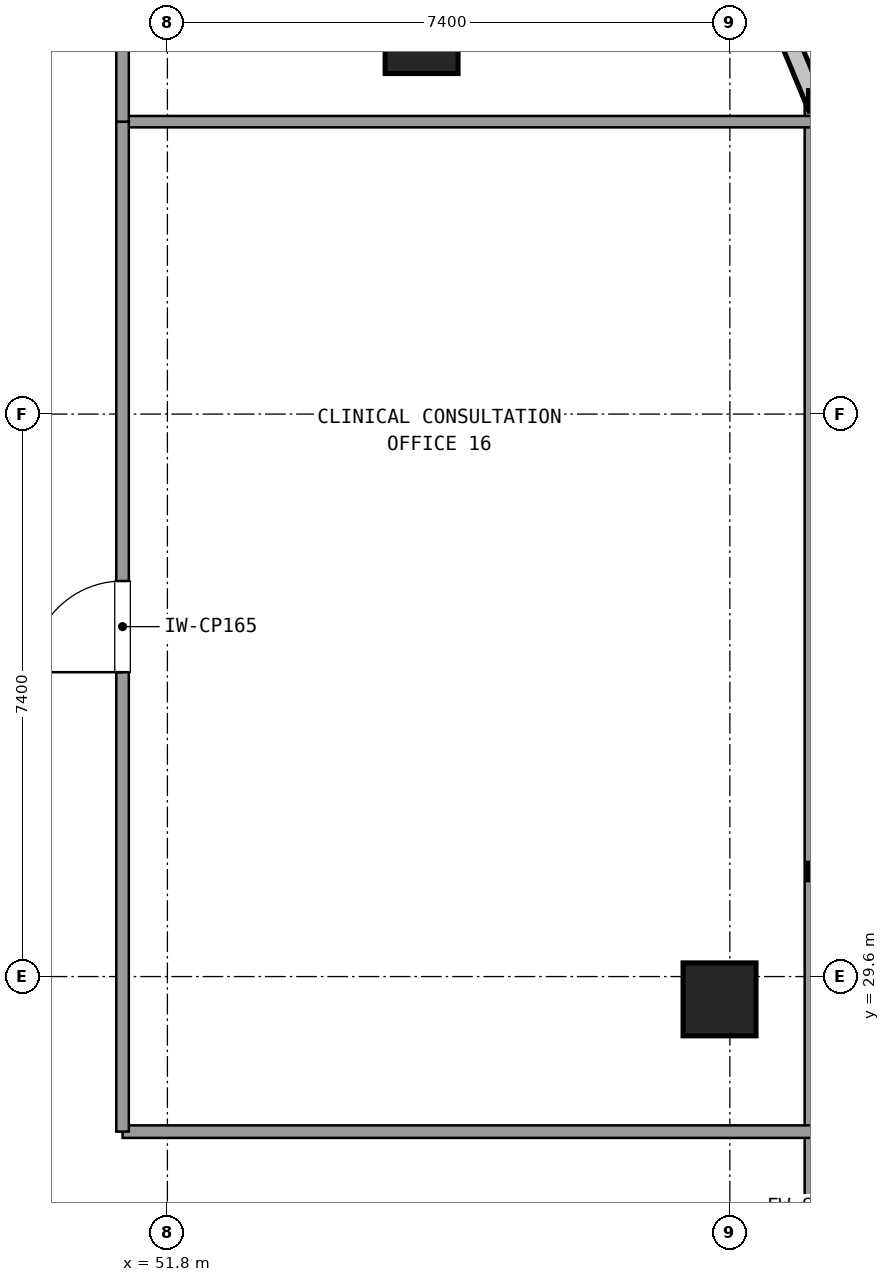
"""IFC4 building model, lengths in metres.
Left out: names, types, materials, properties, quantities, classifications, styles, units other than length and angle.
Written with IfcOpenShell. Run it as: python <this file> out.ifc"""

import sys

from ifc_helpers import new_model, si_unit, direction, frame, frame_2d, origin, origin_2d, place, context, subcontext, project, spatial, rectangle, extrude, element, fill, save


model = new_model("IFC4")
c1 = context("Model", 3, precision=1e-05, world=origin(), true_north=direction((0.0, 1.0)))
c2 = subcontext(c1, "Body", "Model", "MODEL_VIEW")
j1 = project(units=[si_unit("LENGTHUNIT", "METRE"), si_unit("PLANEANGLEUNIT", "RADIAN")], contexts=[c1])
p1 = place(None, origin())
s1 = spatial("IfcSite", under=j1, at=p1, CompositionType="ELEMENT")
p2 = place(p1, origin())
s2 = spatial("IfcBuilding", under=s1, at=p2, CompositionType="ELEMENT")
p3 = place(p2, frame((0.0, 0.0, 138.42)))
s3 = spatial("IfcBuildingStorey", under=s2, at=p3, CompositionType="ELEMENT", Elevation=138.42)
for number, where, z_axis, x_axis in (
    (1, (59.064, 29.3, 0.0), (0.0, 0.0, 1.0), (1.0, 0.0, 0.0)),
    (2, (55.144, 41.96, 0.0), (0.0, 0.0, 1.0), (1.0, 0.0, 0.0)),
):
    element("IfcColumn", number, at=place(p3, frame(where, z_axis=z_axis, x_axis=x_axis)), inside=s3, PredefinedType="COLUMN", context=c2, shape_type="SweptSolid", body=[
        extrude(rectangle(XDim=0.96, YDim=0.96, at=origin_2d()), origin(), (0.0, 0.0, 1.0), 3.6),
    ])
p4 = place(p3, frame((60.304, 10.655, 0.0), z_axis=(0.0, 0.0, 1.0), x_axis=(0.0, 1.0, 0.0)))
e3 = element("IfcWall", 3, at=p4, inside=s3, PredefinedType="SOLIDWALL", context=c2, shape_type="SweptSolid", body=[
    extrude(rectangle(XDim=30.49, YDim=0.24, at=frame_2d((15.245, 0.0))), origin(), (0.0, 0.0, 1.0), 0.85),
])
p5 = place(p3, frame((51.21, 27.56, 0.0), z_axis=(0.0, 0.0, 1.0), x_axis=(1.0, 0.0, 0.0)))
e4 = element("IfcWall", 4, at=p5, inside=s3, PredefinedType="PARTITIONING", context=c2, shape_type="SweptSolid", body=[
    extrude(rectangle(XDim=9.074, YDim=0.165, at=frame_2d((4.537, 0.0))), origin(), (0.0, 0.0, 1.0), 2.61),
])
p6 = place(p3, frame((51.21, 40.847, 0.0), z_axis=(0.0, 0.0, 1.0), x_axis=(1.0, 0.0, 0.0)))
e5 = element("IfcWall", 5, at=p6, inside=s3, PredefinedType="PARTITIONING", context=c2, shape_type="SweptSolid", body=[
    extrude(rectangle(XDim=9.074, YDim=0.15, at=frame_2d((4.537, 0.0))), origin(), (0.0, 0.0, 1.0), 2.61),
])
p7 = place(p3, frame((51.21, 27.56, 0.0), z_axis=(0.0, 0.0, 1.0), x_axis=(0.0, 1.0, 0.0)))
e6 = element("IfcWall", 6, at=p7, inside=s3, PredefinedType="PARTITIONING", context=c2, shape_type="SweptSolid", body=[
    extrude(rectangle(XDim=13.287, YDim=0.165, at=frame_2d((6.644, 0.0))), origin(), (0.0, 0.0, 1.0), 2.61),
])
p8 = place(p7, frame((6.044, 0.0, 0.0)))
e7 = element("IfcOpeningElement", 7, at=p8, cuts=e6, PredefinedType="OPENING", context=c2, shape_type="SweptSolid", body=[
    extrude(rectangle(XDim=1.2, YDim=2.15, at=frame_2d((0.6, 1.075))), frame((0.0, 0.093, 0.0), z_axis=(0.0, -1.0, 0.0), x_axis=(1.0, 0.0, 0.0)), (0.0, 0.0, 1.0), 0.185),
])
p9 = place(p3, frame((51.21, 40.847, 0.0), z_axis=(0.0, 0.0, 1.0), x_axis=(0.0, 1.0, 0.0)))
e8 = element("IfcWall", 8, at=p9, inside=s3, PredefinedType="PARTITIONING", context=c2, shape_type="SweptSolid", body=[
    extrude(rectangle(XDim=6.253, YDim=0.165, at=frame_2d((3.126, 0.0))), origin(), (0.0, 0.0, 1.0), 2.61),
])
p10 = place(p9, frame((2.526, 0.0, 0.0)))
e9 = element("IfcOpeningElement", 9, at=p10, cuts=e8, PredefinedType="OPENING", context=c2, shape_type="SweptSolid", body=[
    extrude(rectangle(XDim=1.2, YDim=2.15, at=frame_2d((0.6, 1.075))), frame((0.0, 0.093, 0.0), z_axis=(0.0, -1.0, 0.0), x_axis=(1.0, 0.0, 0.0)), (0.0, 0.0, 1.0), 0.185),
])
p11 = place(p8, origin())
e10 = element("IfcDoor", 10, at=p11, inside=s3, OperationType="SINGLE_SWING_LEFT", PredefinedType="DOOR", context=c2, shape_type="SweptSolid", body=[
    extrude(rectangle(XDim=1.2, YDim=2.15, at=frame_2d((0.6, 1.075))), frame((0.0, 0.025, 0.0), z_axis=(0.0, -1.0, 0.0), x_axis=(1.0, 0.0, 0.0)), (0.0, 0.0, 1.0), 0.05),
])
fill(e7, e10)
save(model, sys.argv[1])
